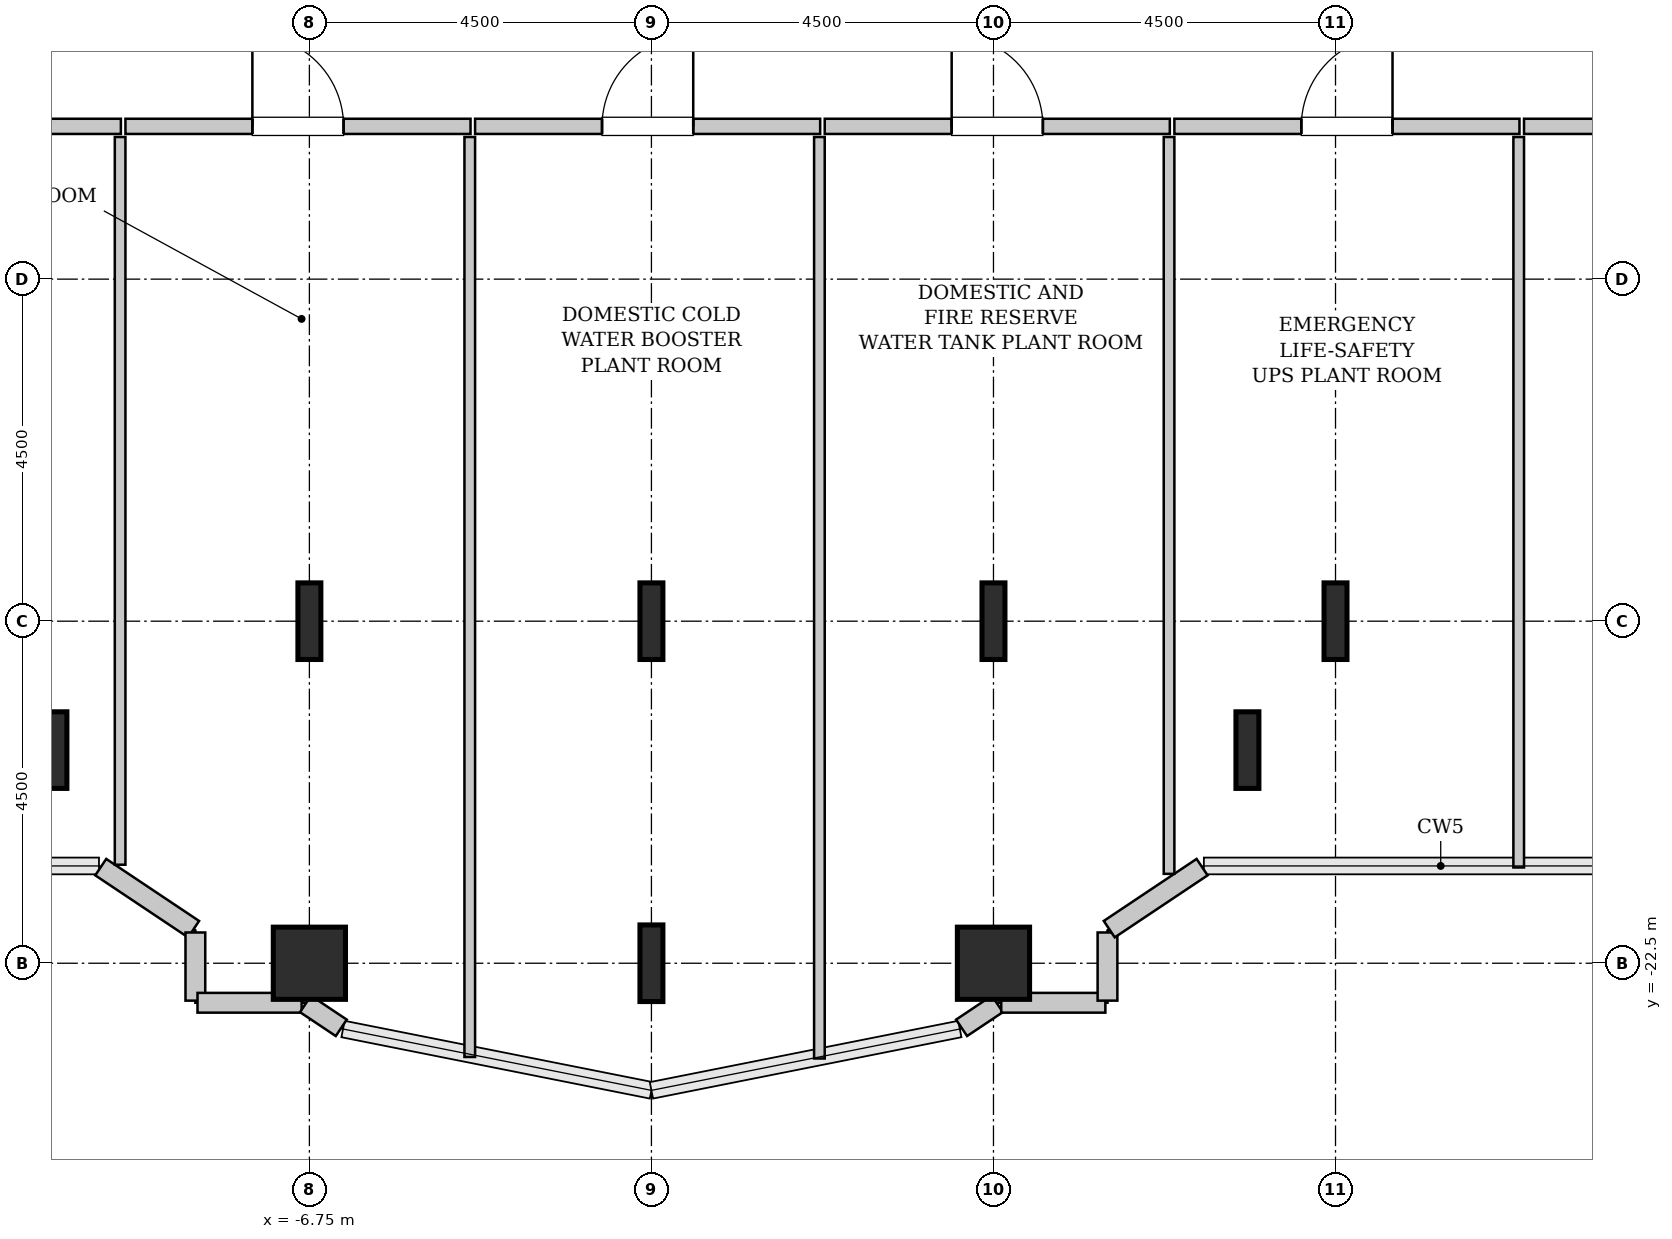
"""IFC4 building model, lengths in metres.
Left out: names, types, materials, properties, quantities, classifications, styles, units other than length and angle.
Written with IfcOpenShell. Run it as: python <this file> out.ifc"""

import sys

from ifc_helpers import new_model, si_unit, direction, frame, frame_2d, origin, origin_2d, place, context, subcontext, project, spatial, rectangle, hollow_rectangle, i_section, extrude, source, transform, mapped, element, fill, save


model = new_model("IFC4")
c1 = context("Model", 3, precision=1e-05, world=origin(), true_north=direction((0.0, 1.0)))
c2 = subcontext(c1, "Body", "Model", "MODEL_VIEW")
j1 = project(units=[si_unit("LENGTHUNIT", "METRE"), si_unit("PLANEANGLEUNIT", "RADIAN")], contexts=[c1])
p1 = place(None, origin())
s1 = spatial("IfcSite", under=j1, at=p1, CompositionType="ELEMENT")
p2 = place(p1, origin())
s2 = spatial("IfcBuilding", under=s1, at=p2, CompositionType="ELEMENT")
p3 = place(p2, frame((0.0, 0.0, 86.2)))
s3 = spatial("IfcBuildingStorey", under=s2, at=p3, CompositionType="ELEMENT", Elevation=86.2)
m1 = source(origin(), c2, "Body", "SweptSolid", [
    extrude(i_section(OverallWidth=0.302, OverallDepth=1.008, WebThickness=0.021, FlangeThickness=0.04, FilletRadius=0.03, at=origin_2d()), origin(), (0.0, 0.0, 1.0), 4.6),
])
p4 = place(p3, frame((-10.091, -19.696, 0.0), z_axis=(0.0, 0.0, 1.0), x_axis=(1.0, 0.0, 0.0)))
e1 = element("IfcColumn", 1, at=p4, inside=s3, PredefinedType="COLUMN", context=c2, shape_type="MappedRepresentation", body=[
    mapped(m1, transform((0.0, 0.0, 0.0), x_axis=(1.0, 0.0, 0.0), y_axis=(0.0, 1.0, 0.0), z_axis=(0.0, 0.0, 1.0), scale=1.0)),
])
m2 = source(origin(), c2, "Body", "SweptSolid", [
    extrude(hollow_rectangle(XDim=0.95, YDim=0.95, WallThickness=0.045, InnerFilletRadius=0.045, OuterFilletRadius=0.09, at=origin_2d()), origin(), (0.0, 0.0, 1.0), 4.6),
])
p5 = place(p3, frame((-6.75, -22.5, 0.0), z_axis=(0.0, 0.0, 1.0), x_axis=(1.0, 0.0, 0.0)))
e2 = element("IfcColumn", 2, at=p5, inside=s3, PredefinedType="COLUMN", context=c2, shape_type="MappedRepresentation", body=[
    mapped(m2, transform((0.0, 0.0, 0.0), x_axis=(1.0, 0.0, 0.0), y_axis=(0.0, 1.0, 0.0), z_axis=(0.0, 0.0, 1.0), scale=1.0)),
])
for number, where, z_axis, x_axis in (
    (3, (-6.75, -18.0, 0.0), (0.0, 0.0, 1.0), (1.0, 0.0, 0.0)),
    (4, (-2.25, -22.5, 0.0), (0.0, 0.0, 1.0), (1.0, 0.0, 0.0)),
    (5, (-2.25, -18.0, 0.0), (0.0, 0.0, 1.0), (1.0, 0.0, 0.0)),
):
    element("IfcColumn", number, at=place(p3, frame(where, z_axis=z_axis, x_axis=x_axis)), inside=s3, PredefinedType="COLUMN", context=c2, shape_type="MappedRepresentation", body=[
        mapped(m1, transform((0.0, 0.0, 0.0), x_axis=(1.0, 0.0, 0.0), y_axis=(0.0, 1.0, 0.0), z_axis=(0.0, 0.0, 1.0), scale=1.0)),
    ])
p6 = place(p3, frame((2.25, -22.5, 0.0), z_axis=(0.0, 0.0, 1.0), x_axis=(1.0, 0.0, 0.0)))
e6 = element("IfcColumn", 6, at=p6, inside=s3, PredefinedType="COLUMN", context=c2, shape_type="MappedRepresentation", body=[
    mapped(m2, transform((0.0, 0.0, 0.0), x_axis=(1.0, 0.0, 0.0), y_axis=(0.0, 1.0, 0.0), z_axis=(0.0, 0.0, 1.0), scale=1.0)),
])
for number, where, z_axis, x_axis in (
    (7, (2.25, -18.0, 0.0), (0.0, 0.0, 1.0), (1.0, 0.0, 0.0)),
    (8, (5.591, -19.696, 0.0), (0.0, 0.0, 1.0), (1.0, 0.0, 0.0)),
    (9, (6.75, -18.0, 0.0), (0.0, 0.0, 1.0), (1.0, 0.0, 0.0)),
):
    element("IfcColumn", number, at=place(p3, frame(where, z_axis=z_axis, x_axis=x_axis)), inside=s3, PredefinedType="COLUMN", context=c2, shape_type="MappedRepresentation", body=[
        mapped(m1, transform((0.0, 0.0, 0.0), x_axis=(1.0, 0.0, 0.0), y_axis=(0.0, 1.0, 0.0), z_axis=(0.0, 0.0, 1.0), scale=1.0)),
    ])
m3 = source(origin(), c2, "Body", "SweptSolid", [
    extrude(rectangle(XDim=1.469, YDim=0.26, at=frame_2d((0.734, 0.0))), origin(), (0.0, 0.0, 1.0), 4.35),
])
p7 = place(p3, frame((-9.495, -21.236, 0.0), z_axis=(0.0, 0.0, 1.0), x_axis=(0.831461760506, -0.555581983884, 0.0)))
e10 = element("IfcWall", 10, at=p7, inside=s3, PredefinedType="SOLIDWALL", context=c2, shape_type="MappedRepresentation", body=[
    mapped(m3, transform((0.0, 0.0, 0.0), x_axis=(1.0, 0.0, 0.0), y_axis=(0.0, 1.0, 0.0), z_axis=(0.0, 0.0, 1.0), scale=1.0)),
])
m4 = source(origin(), c2, "Body", "SweptSolid", [
    extrude(rectangle(XDim=0.897, YDim=0.26, at=frame_2d((0.448, 0.0))), origin(), (0.0, 0.0, 1.0), 4.35),
])
p8 = place(p3, frame((-8.25, -22.095, 0.0), z_axis=(0.0, 0.0, 1.0), x_axis=(0.0, -1.0, 0.0)))
e11 = element("IfcWall", 11, at=p8, inside=s3, PredefinedType="SOLIDWALL", context=c2, shape_type="MappedRepresentation", body=[
    mapped(m4, transform((0.0, 0.0, 0.0), x_axis=(1.0, 0.0, 0.0), y_axis=(0.0, 1.0, 0.0), z_axis=(0.0, 0.0, 1.0), scale=1.0)),
])
m5 = source(origin(), c2, "Body", "SweptSolid", [
    extrude(rectangle(XDim=1.37, YDim=0.26, at=frame_2d((0.685, 0.0))), origin(), (0.0, 0.0, 1.0), 4.35),
])
p9 = place(p3, frame((-8.222, -23.02, 0.0), z_axis=(0.0, 0.0, 1.0), x_axis=(1.0, 0.0, 0.0)))
e12 = element("IfcWall", 12, at=p9, inside=s3, PredefinedType="SOLIDWALL", context=c2, shape_type="MappedRepresentation", body=[
    mapped(m5, transform((0.0, 0.0, 0.0), x_axis=(1.0, 0.0, 0.0), y_axis=(0.0, 1.0, 0.0), z_axis=(0.0, 0.0, 1.0), scale=1.0)),
])
m6 = source(origin(), c2, "Body", "SweptSolid", [
    extrude(rectangle(XDim=0.565, YDim=0.26, at=frame_2d((0.283, 0.0))), origin(), (0.0, 0.0, 1.0), 4.35),
])
for number, where, z_axis, x_axis in (
    (13, (-6.801, -23.036, 0.0), (0.0, 0.0, 1.0), (0.832, -0.555, 0.0)),
    (14, (1.831, -23.35, 0.0), (0.0, 0.0, 1.0), (0.832, 0.555, 0.0)),
):
    element("IfcWall", number, at=place(p3, frame(where, z_axis=z_axis, x_axis=x_axis)), inside=s3, PredefinedType="SOLIDWALL", context=c2, shape_type="MappedRepresentation", body=[
        mapped(m6, transform((0.0, 0.0, 0.0), x_axis=(1.0, 0.0, 0.0), y_axis=(0.0, 1.0, 0.0), z_axis=(0.0, 0.0, 1.0), scale=1.0)),
    ])
p10 = place(p3, frame((2.352, -23.02, 0.0), z_axis=(0.0, 0.0, 1.0), x_axis=(1.0, 0.0, 0.0)))
e15 = element("IfcWall", 15, at=p10, inside=s3, PredefinedType="SOLIDWALL", context=c2, shape_type="MappedRepresentation", body=[
    mapped(m5, transform((0.0, 0.0, 0.0), x_axis=(1.0, 0.0, 0.0), y_axis=(0.0, 1.0, 0.0), z_axis=(0.0, 0.0, 1.0), scale=1.0)),
])
p11 = place(p3, frame((3.75, -22.992, 0.0), z_axis=(0.0, 0.0, 1.0), x_axis=(0.0, 1.0, 0.0)))
e16 = element("IfcWall", 16, at=p11, inside=s3, PredefinedType="SOLIDWALL", context=c2, shape_type="MappedRepresentation", body=[
    mapped(m4, transform((0.0, 0.0, 0.0), x_axis=(1.0, 0.0, 0.0), y_axis=(0.0, 1.0, 0.0), z_axis=(0.0, 0.0, 1.0), scale=1.0)),
])
p12 = place(p3, frame((3.773, -22.052, 0.0), z_axis=(0.0, 0.0, 1.0), x_axis=(0.831461760506, 0.555581983884, 0.0)))
e17 = element("IfcWall", 17, at=p12, inside=s3, PredefinedType="SOLIDWALL", context=c2, shape_type="MappedRepresentation", body=[
    mapped(m3, transform((0.0, 0.0, 0.0), x_axis=(1.0, 0.0, 0.0), y_axis=(0.0, 1.0, 0.0), z_axis=(0.0, 0.0, 1.0), scale=1.0)),
])
m7 = source(origin(), c2, "Body", "SweptSolid", [
    extrude(rectangle(XDim=24.85, YDim=0.2, at=frame_2d((12.425, 0.0))), origin(), (0.0, 0.0, 1.0), 4.335),
])
p13 = place(p3, frame((-34.08, -11.49, 0.0), z_axis=(0.0, 0.0, 1.0), x_axis=(1.0, 0.0, 0.0)))
e18 = element("IfcWall", 18, at=p13, inside=s3, PredefinedType="SOLIDWALL", context=c2, shape_type="MappedRepresentation", body=[
    mapped(m7, transform((0.0, 0.0, 0.0), x_axis=(1.0, 0.0, 0.0), y_axis=(0.0, 1.0, 0.0), z_axis=(0.0, 0.0, 1.0), scale=1.0)),
])
p14 = place(p13, frame((21.786, 0.0, 0.0)))
e19 = element("IfcOpeningElement", 19, at=p14, cuts=e18, PredefinedType="OPENING", context=c2, shape_type="SweptSolid", body=[
    extrude(rectangle(XDim=1.2, YDim=2.15, at=frame_2d((0.6, 1.075))), frame((0.0, 0.11, 0.0), z_axis=(0.0, -1.0, 0.0), x_axis=(1.0, 0.0, 0.0)), (0.0, 0.0, 1.0), 0.22),
])
m8 = source(origin(), c2, "Body", "SweptSolid", [
    extrude(rectangle(XDim=9.574, YDim=0.14, at=frame_2d((4.787, 0.0))), origin(), (0.0, 0.0, 1.0), 4.335),
])
p15 = place(p3, frame((-9.24, -21.204, 0.0), z_axis=(0.0, 0.0, 1.0), x_axis=(0.0, 1.0, 0.0)))
e20 = element("IfcWall", 20, at=p15, inside=s3, PredefinedType="PARTITIONING", context=c2, shape_type="MappedRepresentation", body=[
    mapped(m8, transform((0.0, 0.0, 0.0), x_axis=(1.0, 0.0, 0.0), y_axis=(0.0, 1.0, 0.0), z_axis=(0.0, 0.0, 1.0), scale=1.0)),
])
m9 = source(origin(), c2, "Body", "SweptSolid", [
    extrude(rectangle(XDim=4.54, YDim=0.2, at=frame_2d((2.27, 0.0))), origin(), (0.0, 0.0, 1.0), 4.335),
])
p16 = place(p3, frame((-9.17, -11.49, 0.0), z_axis=(0.0, 0.0, 1.0), x_axis=(1.0, 0.0, 0.0)))
e21 = element("IfcWall", 21, at=p16, inside=s3, PredefinedType="SOLIDWALL", context=c2, shape_type="MappedRepresentation", body=[
    mapped(m9, transform((0.0, 0.0, 0.0), x_axis=(1.0, 0.0, 0.0), y_axis=(0.0, 1.0, 0.0), z_axis=(0.0, 0.0, 1.0), scale=1.0)),
])
p17 = place(p16, frame((1.67, 0.0, 0.0)))
e22 = element("IfcOpeningElement", 22, at=p17, cuts=e21, PredefinedType="OPENING", context=c2, shape_type="SweptSolid", body=[
    extrude(rectangle(XDim=1.2, YDim=2.15, at=frame_2d((0.6, 1.075))), frame((0.0, 0.11, 0.0), z_axis=(0.0, -1.0, 0.0), x_axis=(1.0, 0.0, 0.0)), (0.0, 0.0, 1.0), 0.22),
])
m10 = source(origin(), c2, "Body", "SweptSolid", [
    extrude(rectangle(XDim=12.104, YDim=0.14, at=frame_2d((6.052, 0.0))), origin(), (0.0, 0.0, 1.0), 4.335),
])
p18 = place(p3, frame((-4.64, -23.733, 0.0), z_axis=(0.0, 0.0, 1.0), x_axis=(0.0, 1.0, 0.0)))
e23 = element("IfcWall", 23, at=p18, inside=s3, PredefinedType="PARTITIONING", context=c2, shape_type="MappedRepresentation", body=[
    mapped(m10, transform((0.0, 0.0, 0.0), x_axis=(1.0, 0.0, 0.0), y_axis=(0.0, 1.0, 0.0), z_axis=(0.0, 0.0, 1.0), scale=1.0)),
])
p19 = place(p3, frame((-4.57, -11.49, 0.0), z_axis=(0.0, 0.0, 1.0), x_axis=(1.0, 0.0, 0.0)))
e24 = element("IfcWall", 24, at=p19, inside=s3, PredefinedType="SOLIDWALL", context=c2, shape_type="MappedRepresentation", body=[
    mapped(m9, transform((0.0, 0.0, 0.0), x_axis=(1.0, 0.0, 0.0), y_axis=(0.0, 1.0, 0.0), z_axis=(0.0, 0.0, 1.0), scale=1.0)),
])
p20 = place(p19, frame((1.67, 0.0, 0.0)))
e25 = element("IfcOpeningElement", 25, at=p20, cuts=e24, PredefinedType="OPENING", context=c2, shape_type="SweptSolid", body=[
    extrude(rectangle(XDim=1.2, YDim=2.15, at=frame_2d((0.6, 1.075))), frame((0.0, 0.11, 0.0), z_axis=(0.0, -1.0, 0.0), x_axis=(1.0, 0.0, 0.0)), (0.0, 0.0, 1.0), 0.22),
])
m11 = source(origin(), c2, "Body", "SweptSolid", [
    extrude(rectangle(XDim=12.123, YDim=0.14, at=frame_2d((6.062, 0.0))), origin(), (0.0, 0.0, 1.0), 4.335),
])
p21 = place(p3, frame((-0.04, -23.753, 0.0), z_axis=(0.0, 0.0, 1.0), x_axis=(0.0, 1.0, 0.0)))
e26 = element("IfcWall", 26, at=p21, inside=s3, PredefinedType="PARTITIONING", context=c2, shape_type="MappedRepresentation", body=[
    mapped(m11, transform((0.0, 0.0, 0.0), x_axis=(1.0, 0.0, 0.0), y_axis=(0.0, 1.0, 0.0), z_axis=(0.0, 0.0, 1.0), scale=1.0)),
])
p22 = place(p3, frame((0.03, -11.49, 0.0), z_axis=(0.0, 0.0, 1.0), x_axis=(1.0, 0.0, 0.0)))
e27 = element("IfcWall", 27, at=p22, inside=s3, PredefinedType="SOLIDWALL", context=c2, shape_type="MappedRepresentation", body=[
    mapped(m9, transform((0.0, 0.0, 0.0), x_axis=(1.0, 0.0, 0.0), y_axis=(0.0, 1.0, 0.0), z_axis=(0.0, 0.0, 1.0), scale=1.0)),
])
p23 = place(p22, frame((1.67, 0.0, 0.0)))
e28 = element("IfcOpeningElement", 28, at=p23, cuts=e27, PredefinedType="OPENING", context=c2, shape_type="SweptSolid", body=[
    extrude(rectangle(XDim=1.2, YDim=2.15, at=frame_2d((0.6, 1.075))), frame((0.0, 0.11, 0.0), z_axis=(0.0, -1.0, 0.0), x_axis=(1.0, 0.0, 0.0)), (0.0, 0.0, 1.0), 0.22),
])
m12 = source(origin(), c2, "Body", "SweptSolid", [
    extrude(rectangle(XDim=9.694, YDim=0.14, at=frame_2d((4.847, 0.0))), origin(), (0.0, 0.0, 1.0), 4.335),
])
p24 = place(p3, frame((4.56, -21.324, 0.0), z_axis=(0.0, 0.0, 1.0), x_axis=(0.0, 1.0, 0.0)))
e29 = element("IfcWall", 29, at=p24, inside=s3, PredefinedType="PARTITIONING", context=c2, shape_type="MappedRepresentation", body=[
    mapped(m12, transform((0.0, 0.0, 0.0), x_axis=(1.0, 0.0, 0.0), y_axis=(0.0, 1.0, 0.0), z_axis=(0.0, 0.0, 1.0), scale=1.0)),
])
p25 = place(p3, frame((4.63, -11.49, 0.0), z_axis=(0.0, 0.0, 1.0), x_axis=(1.0, 0.0, 0.0)))
e30 = element("IfcWall", 30, at=p25, inside=s3, PredefinedType="SOLIDWALL", context=c2, shape_type="MappedRepresentation", body=[
    mapped(m9, transform((0.0, 0.0, 0.0), x_axis=(1.0, 0.0, 0.0), y_axis=(0.0, 1.0, 0.0), z_axis=(0.0, 0.0, 1.0), scale=1.0)),
])
p26 = place(p25, frame((1.67, 0.0, 0.0)))
e31 = element("IfcOpeningElement", 31, at=p26, cuts=e30, PredefinedType="OPENING", context=c2, shape_type="SweptSolid", body=[
    extrude(rectangle(XDim=1.2, YDim=2.15, at=frame_2d((0.6, 1.075))), frame((0.0, 0.11, 0.0), z_axis=(0.0, -1.0, 0.0), x_axis=(1.0, 0.0, 0.0)), (0.0, 0.0, 1.0), 0.22),
])
m13 = source(origin(), c2, "Body", "SweptSolid", [
    extrude(rectangle(XDim=9.61, YDim=0.14, at=frame_2d((4.805, 0.0))), origin(), (0.0, 0.0, 1.0), 4.335),
])
p27 = place(p3, frame((9.16, -21.24, 0.0), z_axis=(0.0, 0.0, 1.0), x_axis=(0.0, 1.0, 0.0)))
e32 = element("IfcWall", 32, at=p27, inside=s3, PredefinedType="PARTITIONING", context=c2, shape_type="MappedRepresentation", body=[
    mapped(m13, transform((0.0, 0.0, 0.0), x_axis=(1.0, 0.0, 0.0), y_axis=(0.0, 1.0, 0.0), z_axis=(0.0, 0.0, 1.0), scale=1.0)),
])
p28 = place(p3, frame((9.23, -11.49, 0.0), z_axis=(0.0, 0.0, 1.0), x_axis=(1.0, 0.0, 0.0)))
e33 = element("IfcWall", 33, at=p28, inside=s3, PredefinedType="SOLIDWALL", context=c2, shape_type="MappedRepresentation", body=[
    mapped(m7, transform((0.0, 0.0, 0.0), x_axis=(1.0, 0.0, 0.0), y_axis=(0.0, 1.0, 0.0), z_axis=(0.0, 0.0, 1.0), scale=1.0)),
])
p29 = place(p28, frame((1.864, 0.0, 0.0)))
e34 = element("IfcOpeningElement", 34, at=p29, cuts=e33, PredefinedType="OPENING", context=c2, shape_type="SweptSolid", body=[
    extrude(rectangle(XDim=1.2, YDim=2.15, at=frame_2d((0.6, 1.075))), frame((0.0, 0.11, 0.0), z_axis=(0.0, -1.0, 0.0), x_axis=(1.0, 0.0, 0.0)), (0.0, 0.0, 1.0), 0.22),
])
m14 = source(origin(), c2, "Body", "SweptSolid", [
    extrude(rectangle(XDim=1.2, YDim=2.15, at=frame_2d((0.6, 1.075))), frame((0.0, 0.025, 0.0), z_axis=(0.0, -1.0, 0.0), x_axis=(1.0, 0.0, 0.0)), (0.0, 0.0, 1.0), 0.05),
])
p30 = place(p17, origin())
e35 = element("IfcDoor", 35, at=p30, inside=s3, OperationType="SINGLE_SWING_LEFT", PredefinedType="DOOR", context=c2, shape_type="MappedRepresentation", body=[
    mapped(m14, transform((0.0, 0.0, 0.0), x_axis=(1.0, 0.0, 0.0), y_axis=(0.0, 1.0, 0.0), z_axis=(0.0, 0.0, 1.0), scale=1.0)),
])
fill(e22, e35)
p31 = place(p20, origin())
e36 = element("IfcDoor", 36, at=p31, inside=s3, OperationType="SINGLE_SWING_RIGHT", PredefinedType="DOOR", context=c2, shape_type="MappedRepresentation", body=[
    mapped(m14, transform((0.0, 0.0, 0.0), x_axis=(1.0, 0.0, 0.0), y_axis=(0.0, 1.0, 0.0), z_axis=(0.0, 0.0, 1.0), scale=1.0)),
])
fill(e25, e36)
p32 = place(p23, origin())
e37 = element("IfcDoor", 37, at=p32, inside=s3, OperationType="SINGLE_SWING_LEFT", PredefinedType="DOOR", context=c2, shape_type="MappedRepresentation", body=[
    mapped(m14, transform((0.0, 0.0, 0.0), x_axis=(1.0, 0.0, 0.0), y_axis=(0.0, 1.0, 0.0), z_axis=(0.0, 0.0, 1.0), scale=1.0)),
])
fill(e28, e37)
p33 = place(p26, origin())
e38 = element("IfcDoor", 38, at=p33, inside=s3, OperationType="SINGLE_SWING_RIGHT", PredefinedType="DOOR", context=c2, shape_type="MappedRepresentation", body=[
    mapped(m14, transform((0.0, 0.0, 0.0), x_axis=(1.0, 0.0, 0.0), y_axis=(0.0, 1.0, 0.0), z_axis=(0.0, 0.0, 1.0), scale=1.0)),
])
fill(e31, e38)
save(model, sys.argv[1])
